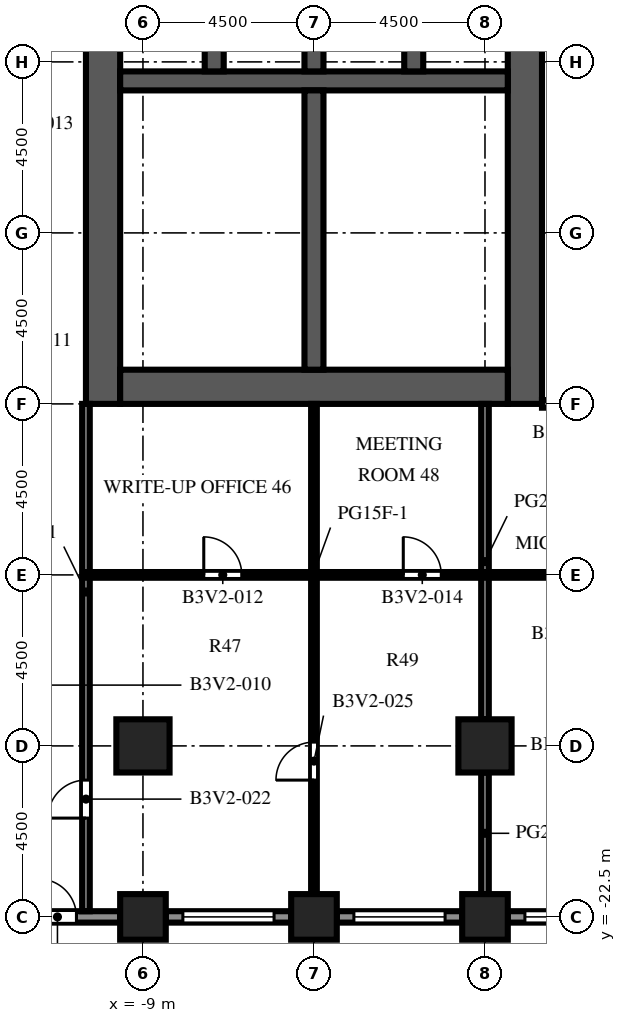
"""IFC4 building model, lengths in metres.
Left out: names, types, materials, properties, quantities, classifications, styles, units other than length and angle.
Written with IfcOpenShell. Run it as: python <this file> out.ifc"""

import sys

from ifc_helpers import new_model, si_unit, direction, frame, frame_2d, origin, origin_2d, place, context, subcontext, project, spatial, rectangle, extrude, element, fill, save


model = new_model("IFC4")
c1 = context("Model", 3, precision=1e-05, world=origin(), true_north=direction((0.0, 1.0)))
c2 = subcontext(c1, "Body", "Model", "MODEL_VIEW")
j1 = project(units=[si_unit("LENGTHUNIT", "METRE"), si_unit("PLANEANGLEUNIT", "RADIAN")], contexts=[c1])
p1 = place(None, origin())
s1 = spatial("IfcSite", under=j1, at=p1, CompositionType="ELEMENT")
p2 = place(p1, origin())
s2 = spatial("IfcBuilding", under=s1, at=p2, CompositionType="ELEMENT")
p3 = place(p2, frame((0.0, 0.0, 98.4)))
s3 = spatial("IfcBuildingStorey", under=s2, at=p3, CompositionType="ELEMENT", Elevation=98.4)
for number, where, z_axis, x_axis in (
    (1, (-9.0, -22.5, 0.0), (0.0, 0.0, 1.0), (1.0, 0.0, 0.0)),
    (2, (-4.5, -22.5, 0.0), (0.0, 0.0, 1.0), (1.0, 0.0, 0.0)),
    (3, (0.0, -22.5, 0.0), (0.0, 0.0, 1.0), (1.0, 0.0, 0.0)),
):
    element("IfcColumn", number, at=place(p3, frame(where, z_axis=z_axis, x_axis=x_axis)), inside=s3, PredefinedType="COLUMN", context=c2, shape_type="SweptSolid", body=[
        extrude(rectangle(XDim=1.2, YDim=1.2, at=origin_2d()), origin(), (0.0, 0.0, 1.0), 4.1),
    ])
for number, where, z_axis, x_axis in (
    (4, (-9.0, -18.0, 0.0), (0.0, 0.0, 1.0), (1.0, 0.0, 0.0)),
    (5, (0.0, -18.0, 0.0), (0.0, 0.0, 1.0), (1.0, 0.0, 0.0)),
):
    element("IfcColumn", number, at=place(p3, frame(where, z_axis=z_axis, x_axis=x_axis)), inside=s3, PredefinedType="COLUMN", context=c2, shape_type="SweptSolid", body=[
        extrude(rectangle(XDim=1.4, YDim=1.4, at=origin_2d()), origin(), (0.0, 0.0, 1.0), 4.1),
    ])
p4 = place(p3, frame((-10.05, -9.0, 0.0), z_axis=(0.0, 0.0, 1.0), x_axis=(0.0, 1.0, 0.0)))
e6 = element("IfcWall", 6, at=p4, inside=s3, PredefinedType="SHEAR", context=c2, shape_type="SweptSolid", body=[
    extrude(rectangle(XDim=27.5, YDim=0.9, at=frame_2d((13.75, 0.0))), origin(), (0.0, 0.0, 1.0), 4.1),
])
p5 = place(p4, frame((12.55, 0.0, 0.0)))
e7 = element("IfcOpeningElement", 7, at=p5, cuts=e6, PredefinedType="OPENING", context=c2, shape_type="SweptSolid", body=[
    extrude(rectangle(XDim=2.4, YDim=2.4, at=frame_2d((1.2, 1.2))), frame((0.0, 0.46, 0.0), z_axis=(0.0, -1.0, 0.0), x_axis=(1.0, 0.0, 0.0)), (0.0, 0.0, 1.0), 0.92),
])
p6 = place(p4, frame((6.825, 0.0, 0.0)))
e8 = element("IfcOpeningElement", 8, at=p6, cuts=e6, PredefinedType="OPENING", context=c2, shape_type="SweptSolid", body=[
    extrude(rectangle(XDim=1.2, YDim=2.1, at=frame_2d((0.6, 1.05))), frame((0.0, 0.46, 0.0), z_axis=(0.0, -1.0, 0.0), x_axis=(1.0, 0.0, 0.0)), (0.0, 0.0, 1.0), 0.92),
])
p7 = place(p4, frame((19.475, 0.0, 0.0)))
e9 = element("IfcOpeningElement", 9, at=p7, cuts=e6, PredefinedType="OPENING", context=c2, shape_type="SweptSolid", body=[
    extrude(rectangle(XDim=1.2, YDim=2.1, at=frame_2d((0.6, 1.05))), frame((0.0, 0.46, 0.0), z_axis=(0.0, -1.0, 0.0), x_axis=(1.0, 0.0, 0.0)), (0.0, 0.0, 1.0), 0.92),
])
p8 = place(p3, frame((1.05, -9.0, 0.0), z_axis=(0.0, 0.0, 1.0), x_axis=(0.0, 1.0, 0.0)))
e10 = element("IfcWall", 10, at=p8, inside=s3, PredefinedType="SHEAR", context=c2, shape_type="SweptSolid", body=[
    extrude(rectangle(XDim=27.5, YDim=0.9, at=frame_2d((13.75, 0.0))), origin(), (0.0, 0.0, 1.0), 4.1),
])
p9 = place(p8, frame((12.55, 0.0, 0.0)))
e11 = element("IfcOpeningElement", 11, at=p9, cuts=e10, PredefinedType="OPENING", context=c2, shape_type="SweptSolid", body=[
    extrude(rectangle(XDim=2.4, YDim=2.4, at=frame_2d((1.2, 1.2))), frame((0.0, 0.46, 0.0), z_axis=(0.0, -1.0, 0.0), x_axis=(1.0, 0.0, 0.0)), (0.0, 0.0, 1.0), 0.92),
])
p10 = place(p8, frame((3.893, 0.0, 0.0)))
e12 = element("IfcOpeningElement", 12, at=p10, cuts=e10, PredefinedType="OPENING", context=c2, shape_type="SweptSolid", body=[
    extrude(rectangle(XDim=0.923, YDim=2.1, at=frame_2d((0.461, 1.05))), frame((0.0, 0.46, 0.0), z_axis=(0.0, -1.0, 0.0), x_axis=(1.0, 0.0, 0.0)), (0.0, 0.0, 1.0), 0.92),
])
p11 = place(p8, frame((23.427, 0.0, 0.0)))
e13 = element("IfcOpeningElement", 13, at=p11, cuts=e10, PredefinedType="OPENING", context=c2, shape_type="SweptSolid", body=[
    extrude(rectangle(XDim=1.2, YDim=2.1, at=frame_2d((0.6, 1.05))), frame((0.0, 0.46, 0.0), z_axis=(0.0, -1.0, 0.0), x_axis=(1.0, 0.0, 0.0)), (0.0, 0.0, 1.0), 0.92),
])
p12 = place(p3, frame((-9.6, -8.55, 0.0), z_axis=(0.0, 0.0, 1.0), x_axis=(1.0, 0.0, 0.0)))
e14 = element("IfcWall", 14, at=p12, inside=s3, PredefinedType="SHEAR", context=c2, shape_type="SweptSolid", body=[
    extrude(rectangle(XDim=10.2, YDim=0.9, at=frame_2d((5.1, 0.0))), origin(), (0.0, 0.0, 1.0), 4.1),
])
p13 = place(p3, frame((-9.6, -0.5, 0.0), z_axis=(0.0, 0.0, 1.0), x_axis=(1.0, 0.0, 0.0)))
e15 = element("IfcWall", 15, at=p13, inside=s3, PredefinedType="SHEAR", context=c2, shape_type="SweptSolid", body=[
    extrude(rectangle(XDim=10.2, YDim=0.5, at=frame_2d((5.1, 0.0))), origin(), (0.0, 0.0, 1.0), 4.1),
])
for number, where, z_axis, x_axis in (
    (16, (-7.125, -0.25, 0.0), (0.0, 0.0, 1.0), (0.0, 1.0, 0.0)),
    (17, (-4.5, -0.25, 0.0), (0.0, 0.0, 1.0), (0.0, 1.0, 0.0)),
    (18, (-1.875, -0.25, 0.0), (0.0, 0.0, 1.0), (0.0, 1.0, 0.0)),
):
    element("IfcWall", number, at=place(p3, frame(where, z_axis=z_axis, x_axis=x_axis)), inside=s3, PredefinedType="SHEAR", context=c2, shape_type="SweptSolid", body=[
        extrude(rectangle(XDim=2.8, YDim=0.5, at=frame_2d((1.4, 0.0))), origin(), (0.0, 0.0, 1.0), 4.1),
    ])
p14 = place(p3, frame((-4.5, -8.1, 0.0), z_axis=(0.0, 0.0, 1.0), x_axis=(0.0, 1.0, 0.0)))
e19 = element("IfcWall", 19, at=p14, inside=s3, PredefinedType="SHEAR", context=c2, shape_type="SweptSolid", body=[
    extrude(rectangle(XDim=7.35, YDim=0.5, at=frame_2d((3.675, 0.0))), origin(), (0.0, 0.0, 1.0), 4.1),
])
p15 = place(p3, frame((-9.6, -22.5, 0.0), z_axis=(0.0, 0.0, 1.0), x_axis=(-1.0, 0.0, 0.0)))
e20 = element("IfcWall", 20, at=p15, inside=s3, PredefinedType="SOLIDWALL", context=c2, shape_type="SweptSolid", body=[
    extrude(rectangle(XDim=3.3, YDim=0.3, at=frame_2d((1.65, 0.0))), origin(), (0.0, 0.0, 1.0), 2.75),
])
p16 = place(p15, frame((1.15, 0.0, 0.0)))
e21 = element("IfcOpeningElement", 21, at=p16, cuts=e20, PredefinedType="OPENING", context=c2, shape_type="SweptSolid", body=[
    extrude(rectangle(XDim=1.0, YDim=2.2, at=frame_2d((0.5, 1.1))), frame((0.0, 0.16, 0.0), z_axis=(0.0, -1.0, 0.0), x_axis=(1.0, 0.0, 0.0)), (0.0, 0.0, 1.0), 0.32),
])
p17 = place(p3, frame((-5.1, -22.5, 0.0), z_axis=(0.0, 0.0, 1.0), x_axis=(-1.0, 0.0, 0.0)))
e22 = element("IfcWall", 22, at=p17, inside=s3, PredefinedType="SOLIDWALL", context=c2, shape_type="SweptSolid", body=[
    extrude(rectangle(XDim=3.3, YDim=0.3, at=frame_2d((1.65, 0.0))), origin(), (0.0, 0.0, 1.0), 2.75),
])
p18 = place(p17, frame((0.45, 0.0, 0.8)))
e23 = element("IfcOpeningElement", 23, at=p18, cuts=e22, PredefinedType="OPENING", context=c2, shape_type="SweptSolid", body=[
    extrude(rectangle(XDim=2.4, YDim=1.7, at=frame_2d((1.2, 0.85))), frame((0.0, 0.16, 0.0), z_axis=(0.0, -1.0, 0.0), x_axis=(1.0, 0.0, 0.0)), (0.0, 0.0, 1.0), 0.32),
])
p19 = place(p3, frame((-0.6, -22.5, 0.0), z_axis=(0.0, 0.0, 1.0), x_axis=(-1.0, 0.0, 0.0)))
e24 = element("IfcWall", 24, at=p19, inside=s3, PredefinedType="SOLIDWALL", context=c2, shape_type="SweptSolid", body=[
    extrude(rectangle(XDim=3.3, YDim=0.3, at=frame_2d((1.65, 0.0))), origin(), (0.0, 0.0, 1.0), 2.75),
])
p20 = place(p19, frame((0.45, 0.0, 0.8)))
e25 = element("IfcOpeningElement", 25, at=p20, cuts=e24, PredefinedType="OPENING", context=c2, shape_type="SweptSolid", body=[
    extrude(rectangle(XDim=2.4, YDim=1.7, at=frame_2d((1.2, 0.85))), frame((0.0, 0.16, 0.0), z_axis=(0.0, -1.0, 0.0), x_axis=(1.0, 0.0, 0.0)), (0.0, 0.0, 1.0), 0.32),
])
p21 = place(p3, frame((3.9, -22.5, 0.0), z_axis=(0.0, 0.0, 1.0), x_axis=(-1.0, 0.0, 0.0)))
e26 = element("IfcWall", 26, at=p21, inside=s3, PredefinedType="SOLIDWALL", context=c2, shape_type="SweptSolid", body=[
    extrude(rectangle(XDim=3.3, YDim=0.3, at=frame_2d((1.65, 0.0))), origin(), (0.0, 0.0, 1.0), 2.75),
])
p22 = place(p21, frame((0.45, 0.0, 0.8)))
e27 = element("IfcOpeningElement", 27, at=p22, cuts=e26, PredefinedType="OPENING", context=c2, shape_type="SweptSolid", body=[
    extrude(rectangle(XDim=2.4, YDim=1.7, at=frame_2d((1.2, 0.85))), frame((0.0, 0.16, 0.0), z_axis=(0.0, -1.0, 0.0), x_axis=(1.0, 0.0, 0.0)), (0.0, 0.0, 1.0), 0.32),
])
p23 = place(p3, frame((-4.25, -5.307, 0.0), z_axis=(0.0, 0.0, 1.0), x_axis=(1.0, 0.0, 0.0)))
e28 = element("IfcWall", 28, at=p23, inside=s3, PredefinedType="PARTITIONING", context=c2, shape_type="SweptSolid", body=[
    extrude(rectangle(XDim=4.85, YDim=0.1, at=frame_2d((2.425, 0.0))), origin(), (0.0, 0.0, 1.0), 3.65),
])
p24 = place(p23, frame((1.925, 0.0, 0.0)))
e29 = element("IfcOpeningElement", 29, at=p24, cuts=e28, PredefinedType="OPENING", context=c2, shape_type="SweptSolid", body=[
    extrude(rectangle(XDim=1.0, YDim=2.1, at=frame_2d((0.5, 1.05))), frame((0.0, 0.06, 0.0), z_axis=(0.0, -1.0, 0.0), x_axis=(1.0, 0.0, 0.0)), (0.0, 0.0, 1.0), 0.12),
])
p25 = place(p3, frame((-2.407, -3.984, 0.0), z_axis=(0.0, 0.0, 1.0), x_axis=(1.0, 0.0, 0.0)))
e30 = element("IfcWall", 30, at=p25, inside=s3, PredefinedType="PARTITIONING", context=c2, shape_type="SweptSolid", body=[
    extrude(rectangle(XDim=3.007, YDim=0.1, at=frame_2d((1.503, 0.0))), origin(), (0.0, 0.0, 1.0), 3.65),
])
p26 = place(p25, frame((1.003, 0.0, 0.0)))
e31 = element("IfcOpeningElement", 31, at=p26, cuts=e30, PredefinedType="OPENING", context=c2, shape_type="SweptSolid", body=[
    extrude(rectangle(XDim=1.0, YDim=2.1, at=frame_2d((0.5, 1.05))), frame((0.0, 0.06, 0.0), z_axis=(0.0, -1.0, 0.0), x_axis=(1.0, 0.0, 0.0)), (0.0, 0.0, 1.0), 0.12),
])
p27 = place(p3, frame((-4.25, -3.984, 0.0), z_axis=(0.0, 0.0, 1.0), x_axis=(1.0, 0.0, 0.0)))
e32 = element("IfcWall", 32, at=p27, inside=s3, PredefinedType="PARTITIONING", context=c2, shape_type="SweptSolid", body=[
    extrude(rectangle(XDim=1.843, YDim=0.1, at=frame_2d((0.921, 0.0))), origin(), (0.0, 0.0, 1.0), 3.65),
])
p28 = place(p27, frame((0.421, 0.0, 0.0)))
e33 = element("IfcOpeningElement", 33, at=p28, cuts=e32, PredefinedType="OPENING", context=c2, shape_type="SweptSolid", body=[
    extrude(rectangle(XDim=1.0, YDim=2.1, at=frame_2d((0.5, 1.05))), frame((0.0, 0.06, 0.0), z_axis=(0.0, -1.0, 0.0), x_axis=(1.0, 0.0, 0.0)), (0.0, 0.0, 1.0), 0.12),
])
p29 = place(p3, frame((-2.407, -3.984, 0.0), z_axis=(0.0, 0.0, 1.0), x_axis=(0.0, 1.0, 0.0)))
e34 = element("IfcWall", 34, at=p29, inside=s3, PredefinedType="PARTITIONING", context=c2, shape_type="SweptSolid", body=[
    extrude(rectangle(XDim=3.234, YDim=0.1, at=frame_2d((1.617, 0.0))), origin(), (0.0, 0.0, 1.0), 3.65),
])
p30 = place(p3, frame((-10.5, -9.0, 0.0), z_axis=(0.0, 0.0, 1.0), x_axis=(0.0, -1.0, 0.0)))
e35 = element("IfcWall", 35, at=p30, inside=s3, PredefinedType="PARTITIONING", context=c2, shape_type="SweptSolid", body=[
    extrude(rectangle(XDim=13.35, YDim=0.2, at=frame_2d((6.675, 0.0))), origin(), (0.0, 0.0, 1.0), 3.65),
])
p31 = place(p30, frame((9.9, 0.0, 0.0)))
e36 = element("IfcOpeningElement", 36, at=p31, cuts=e35, PredefinedType="OPENING", context=c2, shape_type="SweptSolid", body=[
    extrude(rectangle(XDim=1.0, YDim=2.1, at=frame_2d((0.5, 1.05))), frame((0.0, 0.11, 0.0), z_axis=(0.0, -1.0, 0.0), x_axis=(1.0, 0.0, 0.0)), (0.0, 0.0, 1.0), 0.22),
])
p32 = place(p3, frame((-4.5, -9.0, 0.0), z_axis=(0.0, 0.0, 1.0), x_axis=(0.0, -1.0, 0.0)))
e37 = element("IfcWall", 37, at=p32, inside=s3, PredefinedType="PARTITIONING", context=c2, shape_type="SweptSolid", body=[
    extrude(rectangle(XDim=12.9, YDim=0.15, at=frame_2d((6.45, 0.0))), origin(), (0.0, 0.0, 1.0), 3.65),
])
p33 = place(p32, frame((8.9, 0.0, 0.0)))
e38 = element("IfcOpeningElement", 38, at=p33, cuts=e37, PredefinedType="OPENING", context=c2, shape_type="SweptSolid", body=[
    extrude(rectangle(XDim=1.0, YDim=2.1, at=frame_2d((0.5, 1.05))), frame((0.0, 0.085, 0.0), z_axis=(0.0, -1.0, 0.0), x_axis=(1.0, 0.0, 0.0)), (0.0, 0.0, 1.0), 0.17),
])
p34 = place(p3, frame((0.0, -21.9, 0.0), z_axis=(0.0, 0.0, 1.0), x_axis=(0.0, 1.0, 0.0)))
e39 = element("IfcWall", 39, at=p34, inside=s3, PredefinedType="PARTITIONING", context=c2, shape_type="SweptSolid", body=[
    extrude(rectangle(XDim=3.2, YDim=0.2, at=frame_2d((1.6, 0.0))), origin(), (0.0, 0.0, 1.0), 3.65),
])
p35 = place(p3, frame((0.0, -17.3, 0.0), z_axis=(0.0, 0.0, 1.0), x_axis=(0.0, 1.0, 0.0)))
e40 = element("IfcWall", 40, at=p35, inside=s3, PredefinedType="PARTITIONING", context=c2, shape_type="SweptSolid", body=[
    extrude(rectangle(XDim=8.3, YDim=0.2, at=frame_2d((4.15, 0.0))), origin(), (0.0, 0.0, 1.0), 3.65),
])
p36 = place(p3, frame((-10.5, -13.5, 0.0), z_axis=(0.0, 0.0, 1.0), x_axis=(1.0, 0.0, 0.0)))
e41 = element("IfcWall", 41, at=p36, inside=s3, PredefinedType="PARTITIONING", context=c2, shape_type="SweptSolid", body=[
    extrude(rectangle(XDim=28.5, YDim=0.15, at=frame_2d((14.25, 0.0))), origin(), (0.0, 0.0, 1.0), 3.65),
])
p37 = place(p36, frame((3.1, 0.0, 0.0)))
e42 = element("IfcOpeningElement", 42, at=p37, cuts=e41, PredefinedType="OPENING", context=c2, shape_type="SweptSolid", body=[
    extrude(rectangle(XDim=1.0, YDim=2.1, at=frame_2d((0.5, 1.05))), frame((0.0, 0.085, 0.0), z_axis=(0.0, -1.0, 0.0), x_axis=(1.0, 0.0, 0.0)), (0.0, 0.0, 1.0), 0.17),
])
p38 = place(p36, frame((8.35, 0.0, 0.0)))
e43 = element("IfcOpeningElement", 43, at=p38, cuts=e41, PredefinedType="OPENING", context=c2, shape_type="SweptSolid", body=[
    extrude(rectangle(XDim=1.0, YDim=2.1, at=frame_2d((0.5, 1.05))), frame((0.0, 0.085, 0.0), z_axis=(0.0, -1.0, 0.0), x_axis=(1.0, 0.0, 0.0)), (0.0, 0.0, 1.0), 0.17),
])
p39 = place(p36, frame((13.85, 0.0, 0.0)))
e44 = element("IfcOpeningElement", 44, at=p39, cuts=e41, PredefinedType="OPENING", context=c2, shape_type="SweptSolid", body=[
    extrude(rectangle(XDim=1.0, YDim=2.1, at=frame_2d((0.5, 1.05))), frame((0.0, 0.085, 0.0), z_axis=(0.0, -1.0, 0.0), x_axis=(1.0, 0.0, 0.0)), (0.0, 0.0, 1.0), 0.17),
])
p40 = place(p36, frame((21.85, 0.0, 0.0)))
e45 = element("IfcOpeningElement", 45, at=p40, cuts=e41, PredefinedType="OPENING", context=c2, shape_type="SweptSolid", body=[
    extrude(rectangle(XDim=1.0, YDim=2.1, at=frame_2d((0.5, 1.05))), frame((0.0, 0.085, 0.0), z_axis=(0.0, -1.0, 0.0), x_axis=(1.0, 0.0, 0.0)), (0.0, 0.0, 1.0), 0.17),
])
p41 = place(p36, frame((25.85, 0.0, 0.0)))
e46 = element("IfcOpeningElement", 46, at=p41, cuts=e41, PredefinedType="OPENING", context=c2, shape_type="SweptSolid", body=[
    extrude(rectangle(XDim=1.0, YDim=2.1, at=frame_2d((0.5, 1.05))), frame((0.0, 0.085, 0.0), z_axis=(0.0, -1.0, 0.0), x_axis=(1.0, 0.0, 0.0)), (0.0, 0.0, 1.0), 0.17),
])
p42 = place(p3, frame((6.0, -9.0, 0.0), z_axis=(0.0, 0.0, 1.0), x_axis=(-1.0, 0.0, 0.0)))
e47 = element("IfcWall", 47, at=p42, inside=s3, PredefinedType="PARTITIONING", context=c2, shape_type="SweptSolid", body=[
    extrude(rectangle(XDim=4.5, YDim=0.2, at=frame_2d((2.25, 0.0))), origin(), (0.0, 0.0, 1.0), 3.65),
])
p43 = place(p42, frame((2.4, 0.0, 0.0)))
e48 = element("IfcOpeningElement", 48, at=p43, cuts=e47, PredefinedType="OPENING", context=c2, shape_type="SweptSolid", body=[
    extrude(rectangle(XDim=1.0, YDim=2.1, at=frame_2d((0.5, 1.05))), frame((0.0, 0.11, 0.0), z_axis=(0.0, -1.0, 0.0), x_axis=(1.0, 0.0, 0.0)), (0.0, 0.0, 1.0), 0.22),
])
p44 = place(p16, origin())
e49 = element("IfcDoor", 49, at=p44, inside=s3, OperationType="SINGLE_SWING_RIGHT", PredefinedType="DOOR", context=c2, shape_type="SweptSolid", body=[
    extrude(rectangle(XDim=1.0, YDim=2.2, at=frame_2d((0.5, 1.1))), frame((0.0, 0.025, 0.0), z_axis=(0.0, -1.0, 0.0), x_axis=(1.0, 0.0, 0.0)), (0.0, 0.0, 1.0), 0.05),
])
fill(e21, e49)
p45 = place(p18, origin())
e50 = element("IfcWindow", 50, at=p45, inside=s3, PartitioningType="SINGLE_PANEL", PredefinedType="WINDOW", context=c2, shape_type="SweptSolid", body=[
    extrude(rectangle(XDim=2.4, YDim=1.7, at=frame_2d((1.2, 0.85))), frame((0.0, 0.03, 0.0), z_axis=(0.0, -1.0, 0.0), x_axis=(1.0, 0.0, 0.0)), (0.0, 0.0, 1.0), 0.06),
])
fill(e23, e50)
p46 = place(p20, origin())
e51 = element("IfcWindow", 51, at=p46, inside=s3, PartitioningType="SINGLE_PANEL", PredefinedType="WINDOW", context=c2, shape_type="SweptSolid", body=[
    extrude(rectangle(XDim=2.4, YDim=1.7, at=frame_2d((1.2, 0.85))), frame((0.0, 0.03, 0.0), z_axis=(0.0, -1.0, 0.0), x_axis=(1.0, 0.0, 0.0)), (0.0, 0.0, 1.0), 0.06),
])
fill(e25, e51)
p47 = place(p22, origin())
e52 = element("IfcWindow", 52, at=p47, inside=s3, PartitioningType="SINGLE_PANEL", PredefinedType="WINDOW", context=c2, shape_type="SweptSolid", body=[
    extrude(rectangle(XDim=2.4, YDim=1.7, at=frame_2d((1.2, 0.85))), frame((0.0, 0.03, 0.0), z_axis=(0.0, -1.0, 0.0), x_axis=(1.0, 0.0, 0.0)), (0.0, 0.0, 1.0), 0.06),
])
fill(e27, e52)
p48 = place(p6, origin())
e53 = element("IfcDoor", 53, at=p48, inside=s3, OperationType="SINGLE_SWING_LEFT", PredefinedType="DOOR", context=c2, shape_type="SweptSolid", body=[
    extrude(rectangle(XDim=1.2, YDim=2.1, at=frame_2d((0.6, 1.05))), frame((0.0, 0.025, 0.0), z_axis=(0.0, -1.0, 0.0), x_axis=(1.0, 0.0, 0.0)), (0.0, 0.0, 1.0), 0.05),
])
fill(e8, e53)
p49 = place(p10, origin())
e54 = element("IfcDoor", 54, at=p49, inside=s3, OperationType="SINGLE_SWING_LEFT", PredefinedType="DOOR", context=c2, shape_type="SweptSolid", body=[
    extrude(rectangle(XDim=0.923, YDim=2.1, at=frame_2d((0.461, 1.05))), frame((0.0, 0.425, 0.0), z_axis=(0.0, -1.0, 0.0), x_axis=(1.0, 0.0, 0.0)), (0.0, 0.0, 1.0), 0.05),
])
fill(e12, e54)
p50 = place(p24, origin())
e55 = element("IfcDoor", 55, at=p50, inside=s3, OperationType="SINGLE_SWING_RIGHT", PredefinedType="DOOR", context=c2, shape_type="SweptSolid", body=[
    extrude(rectangle(XDim=1.0, YDim=2.1, at=frame_2d((0.5, 1.05))), frame((0.0, 0.025, 0.0), z_axis=(0.0, -1.0, 0.0), x_axis=(1.0, 0.0, 0.0)), (0.0, 0.0, 1.0), 0.05),
])
fill(e29, e55)
p51 = place(p26, origin())
e56 = element("IfcDoor", 56, at=p51, inside=s3, OperationType="SINGLE_SWING_LEFT", PredefinedType="DOOR", context=c2, shape_type="SweptSolid", body=[
    extrude(rectangle(XDim=1.0, YDim=2.1, at=frame_2d((0.5, 1.05))), frame((0.0, 0.025, 0.0), z_axis=(0.0, -1.0, 0.0), x_axis=(1.0, 0.0, 0.0)), (0.0, 0.0, 1.0), 0.05),
])
fill(e31, e56)
p52 = place(p28, origin())
e57 = element("IfcDoor", 57, at=p52, inside=s3, OperationType="SINGLE_SWING_RIGHT", PredefinedType="DOOR", context=c2, shape_type="SweptSolid", body=[
    extrude(rectangle(XDim=1.0, YDim=2.1, at=frame_2d((0.5, 1.05))), frame((0.0, 0.025, 0.0), z_axis=(0.0, -1.0, 0.0), x_axis=(1.0, 0.0, 0.0)), (0.0, 0.0, 1.0), 0.05),
])
fill(e33, e57)
p53 = place(p37, origin())
e58 = element("IfcDoor", 58, at=p53, inside=s3, OperationType="SINGLE_SWING_LEFT", PredefinedType="DOOR", context=c2, shape_type="SweptSolid", body=[
    extrude(rectangle(XDim=1.0, YDim=2.1, at=frame_2d((0.5, 1.05))), frame((0.0, 0.025, 0.0), z_axis=(0.0, -1.0, 0.0), x_axis=(1.0, 0.0, 0.0)), (0.0, 0.0, 1.0), 0.05),
])
fill(e42, e58)
p54 = place(p38, origin())
e59 = element("IfcDoor", 59, at=p54, inside=s3, OperationType="SINGLE_SWING_LEFT", PredefinedType="DOOR", context=c2, shape_type="SweptSolid", body=[
    extrude(rectangle(XDim=1.0, YDim=2.1, at=frame_2d((0.5, 1.05))), frame((0.0, 0.025, 0.0), z_axis=(0.0, -1.0, 0.0), x_axis=(1.0, 0.0, 0.0)), (0.0, 0.0, 1.0), 0.05),
])
fill(e43, e59)
p55 = place(p31, origin())
e60 = element("IfcDoor", 60, at=p55, inside=s3, OperationType="SINGLE_SWING_RIGHT", PredefinedType="DOOR", context=c2, shape_type="SweptSolid", body=[
    extrude(rectangle(XDim=1.0, YDim=2.1, at=frame_2d((0.5, 1.05))), frame((0.0, 0.025, 0.0), z_axis=(0.0, -1.0, 0.0), x_axis=(1.0, 0.0, 0.0)), (0.0, 0.0, 1.0), 0.05),
])
fill(e36, e60)
p56 = place(p33, origin())
e61 = element("IfcDoor", 61, at=p56, inside=s3, OperationType="SINGLE_SWING_RIGHT", PredefinedType="DOOR", context=c2, shape_type="SweptSolid", body=[
    extrude(rectangle(XDim=1.0, YDim=2.1, at=frame_2d((0.5, 1.05))), frame((0.0, 0.025, 0.0), z_axis=(0.0, -1.0, 0.0), x_axis=(1.0, 0.0, 0.0)), (0.0, 0.0, 1.0), 0.05),
])
fill(e38, e61)
save(model, sys.argv[1])
